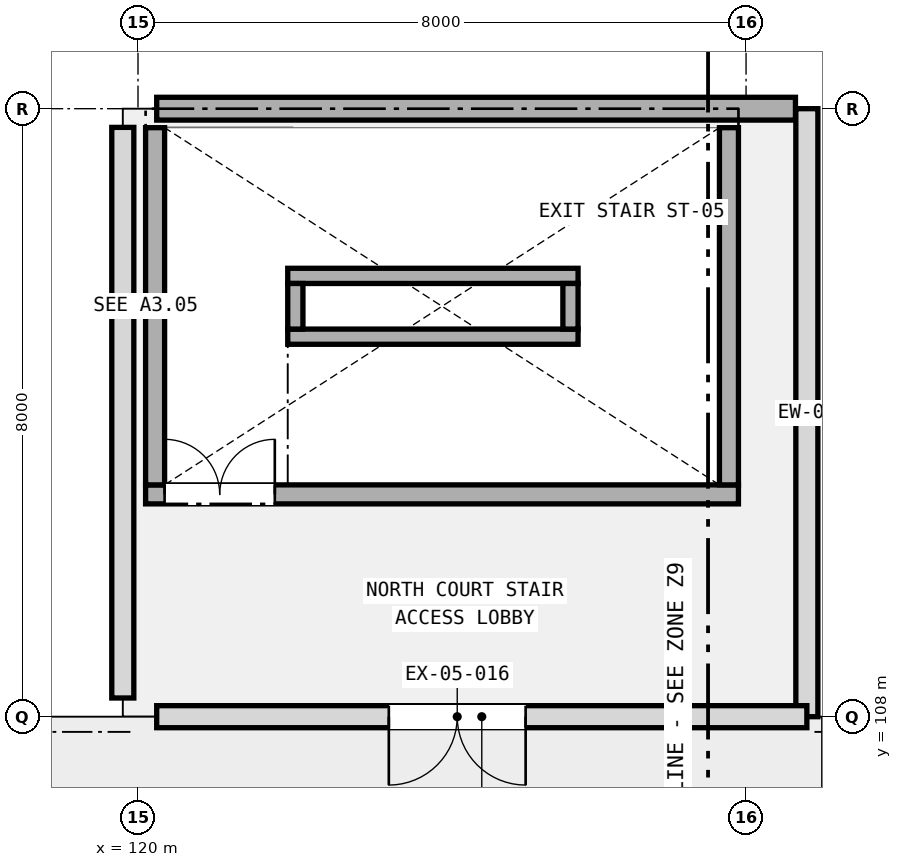
"""IFC4 building model, lengths in metres.
Left out: names, types, materials, properties, quantities, classifications, styles, units other than length and angle.
Written with IfcOpenShell. Run it as: python <this file> out.ifc"""

import sys

from ifc_helpers import new_model, si_unit, direction, frame, frame_2d, origin, place, context, subcontext, project, spatial, rectangle, extrude, element, fill, save


model = new_model("IFC4")
c1 = context("Model", 3, precision=1e-05, world=origin(), true_north=direction((0.0, 1.0)))
c2 = subcontext(c1, "Body", "Model", "MODEL_VIEW")
j1 = project(units=[si_unit("LENGTHUNIT", "METRE"), si_unit("PLANEANGLEUNIT", "RADIAN")], contexts=[c1])
p1 = place(None, origin())
s1 = spatial("IfcSite", under=j1, at=p1, CompositionType="ELEMENT")
p2 = place(p1, origin())
s2 = spatial("IfcBuilding", under=s1, at=p2, CompositionType="ELEMENT")
p3 = place(p2, frame((0.0, 0.0, 10.2)))
s3 = spatial("IfcBuildingStorey", under=s2, at=p3, CompositionType="ELEMENT", Elevation=10.2)
p4 = place(p3, frame((120.246, 116.0, 0.0), z_axis=(0.0, 0.0, 1.0), x_axis=(1.0, 0.0, 0.0)))
e1 = element("IfcWall", 1, at=p4, inside=s3, PredefinedType="SHEAR", context=c2, shape_type="SweptSolid", body=[
    extrude(rectangle(XDim=8.404, YDim=0.3, at=frame_2d((4.202, 0.0))), origin(), (0.0, 0.0, 1.0), 4.2),
])
p5 = place(p3, frame((119.8, 108.246, 0.0), z_axis=(0.0, 0.0, 1.0), x_axis=(0.0, 1.0, 0.0)))
e2 = element("IfcWall", 2, at=p5, inside=s3, PredefinedType="STANDARD", context=c2, shape_type="SweptSolid", body=[
    extrude(rectangle(XDim=7.508, YDim=0.29, at=frame_2d((3.754, 0.0))), origin(), (0.0, 0.0, 1.0), 3.3),
])
p6 = place(p3, frame((128.8, 108.0, 0.0), z_axis=(0.0, 0.0, 1.0), x_axis=(0.0, 1.0, 0.0)))
e3 = element("IfcWall", 3, at=p6, inside=s3, PredefinedType="STANDARD", context=c2, shape_type="SweptSolid", body=[
    extrude(rectangle(XDim=8.0, YDim=0.29, at=frame_2d((4.0, 0.0))), origin(), (0.0, 0.0, 1.0), 3.3),
])
p7 = place(p3, frame((120.246, 108.0, 0.0), z_axis=(0.0, 0.0, 1.0), x_axis=(1.0, 0.0, 0.0)))
e4 = element("IfcWall", 4, at=p7, inside=s3, PredefinedType="STANDARD", context=c2, shape_type="SweptSolid", body=[
    extrude(rectangle(XDim=8.554, YDim=0.29, at=frame_2d((4.277, 0.0))), origin(), (0.0, 0.0, 1.0), 3.3),
])
p8 = place(p7, frame((3.054, 0.0, 0.0)))
e5 = element("IfcOpeningElement", 5, at=p8, cuts=e4, PredefinedType="OPENING", context=c2, shape_type="SweptSolid", body=[
    extrude(rectangle(XDim=1.8, YDim=2.3, at=frame_2d((0.9, 1.15))), frame((0.0, 0.155, 0.0), z_axis=(0.0, -1.0, 0.0), x_axis=(1.0, 0.0, 0.0)), (0.0, 0.0, 1.0), 0.31),
])
p9 = place(p3, frame((120.1, 110.925, 0.0), z_axis=(0.0, 0.0, 1.0), x_axis=(1.0, 0.0, 0.0)))
e6 = element("IfcWall", 6, at=p9, inside=s3, PredefinedType="SHEAR", context=c2, shape_type="SweptSolid", body=[
    extrude(rectangle(XDim=7.8, YDim=0.25, at=frame_2d((3.9, 0.0))), origin(), (0.0, 0.0, 1.0), 3.96),
])
p10 = place(p9, frame((0.25, 0.0, 0.0)))
e7 = element("IfcOpeningElement", 7, at=p10, cuts=e6, PredefinedType="OPENING", context=c2, shape_type="SweptSolid", body=[
    extrude(rectangle(XDim=1.45, YDim=2.2, at=frame_2d((0.725, 1.1))), frame((0.0, 0.135, 0.0), z_axis=(0.0, -1.0, 0.0), x_axis=(1.0, 0.0, 0.0)), (0.0, 0.0, 1.0), 0.27),
])
for number, where, z_axis, x_axis in (
    (8, (120.225, 111.05, 0.0), (0.0, 0.0, 1.0), (0.0, 1.0, 0.0)),
    (9, (127.775, 111.05, 0.0), (0.0, 0.0, 1.0), (0.0, 1.0, 0.0)),
):
    element("IfcWall", number, at=place(p3, frame(where, z_axis=z_axis, x_axis=x_axis)), inside=s3, PredefinedType="SHEAR", context=c2, shape_type="SweptSolid", body=[
        extrude(rectangle(XDim=4.7, YDim=0.25, at=frame_2d((2.35, 0.0))), origin(), (0.0, 0.0, 1.0), 3.96),
    ])
for number, where, z_axis, x_axis in (
    (10, (121.97, 113.0, 0.0), (0.0, 0.0, 1.0), (1.0, 0.0, 0.0)),
    (11, (121.97, 113.8, 0.0), (0.0, 0.0, 1.0), (1.0, 0.0, 0.0)),
):
    element("IfcWall", number, at=place(p3, frame(where, z_axis=z_axis, x_axis=x_axis)), inside=s3, PredefinedType="SHEAR", context=c2, shape_type="SweptSolid", body=[
        extrude(rectangle(XDim=3.82, YDim=0.2, at=frame_2d((1.91, 0.0))), origin(), (0.0, 0.0, 1.0), 3.96),
    ])
for number, where, z_axis, x_axis in (
    (12, (122.07, 113.1, 0.0), (0.0, 0.0, 1.0), (0.0, 1.0, 0.0)),
    (13, (125.69, 113.1, 0.0), (0.0, 0.0, 1.0), (0.0, 1.0, 0.0)),
):
    element("IfcWall", number, at=place(p3, frame(where, z_axis=z_axis, x_axis=x_axis)), inside=s3, PredefinedType="SHEAR", context=c2, shape_type="SweptSolid", body=[
        extrude(rectangle(XDim=0.6, YDim=0.2, at=frame_2d((0.3, 0.0))), origin(), (0.0, 0.0, 1.0), 3.96),
    ])
p11 = place(p8, frame((1.8, 0.0, 0.0), z_axis=(0.0, 0.0, 1.0), x_axis=(-1.0, 0.0, 0.0)))
e14 = element("IfcDoor", 14, at=p11, inside=s3, OperationType="DOUBLE_DOOR_SINGLE_SWING", PredefinedType="DOOR", context=c2, shape_type="SweptSolid", body=[
    extrude(rectangle(XDim=1.8, YDim=2.3, at=frame_2d((0.9, 1.15))), frame((0.0, 0.025, 0.0), z_axis=(0.0, -1.0, 0.0), x_axis=(1.0, 0.0, 0.0)), (0.0, 0.0, 1.0), 0.05),
])
fill(e5, e14)
p12 = place(p10, origin())
e15 = element("IfcDoor", 15, at=p12, inside=s3, OperationType="DOUBLE_DOOR_SINGLE_SWING", PredefinedType="DOOR", context=c2, shape_type="SweptSolid", body=[
    extrude(rectangle(XDim=1.45, YDim=2.2, at=frame_2d((0.725, 1.1))), frame((0.0, 0.025, 0.0), z_axis=(0.0, -1.0, 0.0), x_axis=(1.0, 0.0, 0.0)), (0.0, 0.0, 1.0), 0.05),
])
fill(e7, e15)
save(model, sys.argv[1])
